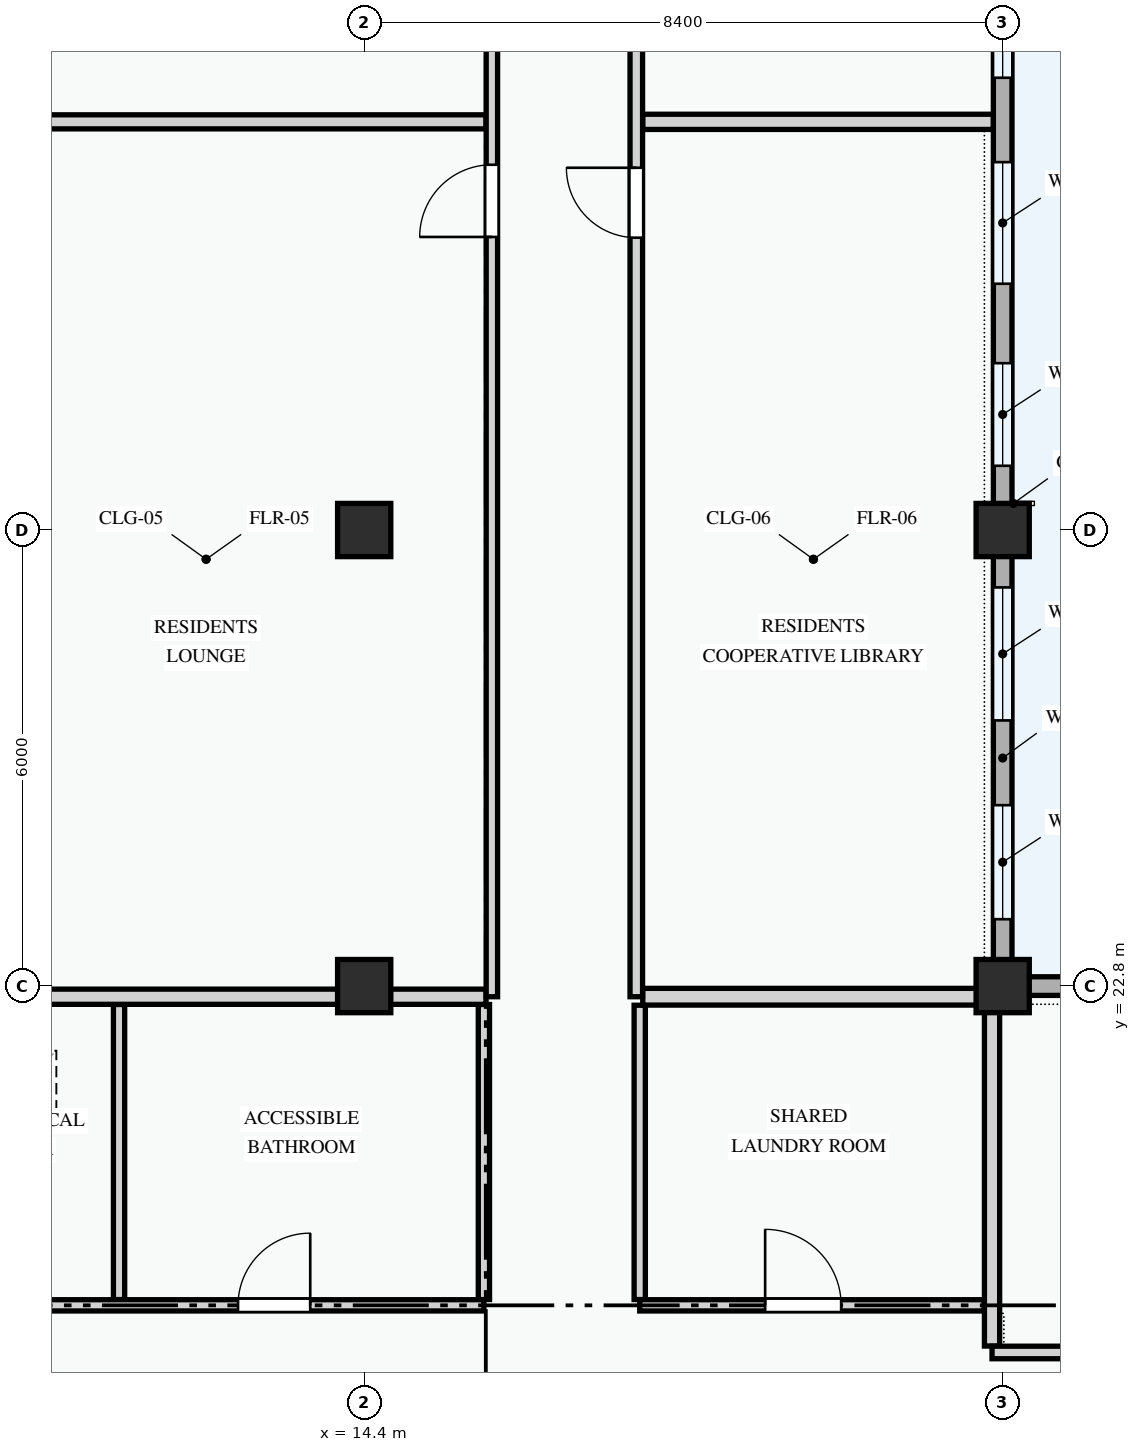
"""IFC4 building model, lengths in metres.
Left out: names, types, materials, properties, quantities, classifications, styles, units other than length and angle.
Written with IfcOpenShell. Run it as: python <this file> out.ifc"""

import sys

from ifc_helpers import new_model, si_unit, direction, frame, frame_2d, origin, origin_2d, place, context, subcontext, project, spatial, rectangle, extrude, element, fill, save


model = new_model("IFC4")
c1 = context("Model", 3, precision=1e-05, world=origin(), true_north=direction((0.0, 1.0)))
c2 = subcontext(c1, "Body", "Model", "MODEL_VIEW")
j1 = project(units=[si_unit("LENGTHUNIT", "METRE"), si_unit("PLANEANGLEUNIT", "RADIAN")], contexts=[c1])
p1 = place(None, origin())
s1 = spatial("IfcSite", under=j1, at=p1, CompositionType="ELEMENT")
p2 = place(p1, origin())
s2 = spatial("IfcBuilding", under=s1, at=p2, CompositionType="ELEMENT")
p3 = place(p2, origin())
s3 = spatial("IfcBuildingStorey", under=s2, at=p3, CompositionType="ELEMENT", Elevation=0.0)
for number, where, z_axis, x_axis in (
    (1, (14.4, 22.8, 0.0), (0.0, 0.0, 1.0), (1.0, 0.0, 0.0)),
    (2, (14.4, 28.8, 0.0), (0.0, 0.0, 1.0), (1.0, 0.0, 0.0)),
    (3, (22.8, 22.8, 0.0), (0.0, 0.0, 1.0), (1.0, 0.0, 0.0)),
    (4, (22.8, 28.8, 0.0), (0.0, 0.0, 1.0), (1.0, 0.0, 0.0)),
):
    element("IfcColumn", number, at=place(p3, frame(where, z_axis=z_axis, x_axis=x_axis)), inside=s3, PredefinedType="COLUMN", context=c2, shape_type="SweptSolid", body=[
        extrude(rectangle(XDim=0.7, YDim=0.7, at=origin_2d()), origin(), (0.0, 0.0, 1.0), 4.5),
    ])
p4 = place(p3, frame((22.8, 22.8, 0.0), z_axis=(0.0, 0.0, 1.0), x_axis=(0.0, 1.0, 0.0)))
e5 = element("IfcWall", 5, at=p4, inside=s3, PredefinedType="STANDARD", context=c2, shape_type="SweptSolid", body=[
    extrude(rectangle(XDim=6.0, YDim=0.245, at=frame_2d((3.0, 0.0))), origin(), (0.0, 0.0, 1.0), 3.585),
])
p5 = place(p4, frame((0.88, 0.0, 0.78)))
e6 = element("IfcOpeningElement", 6, at=p5, cuts=e5, PredefinedType="OPENING", context=c2, shape_type="SweptSolid", body=[
    extrude(rectangle(XDim=1.5, YDim=1.5, at=frame_2d((0.75, 0.75))), frame((0.0, 0.133, 0.0), z_axis=(0.0, -1.0, 0.0), x_axis=(1.0, 0.0, 0.0)), (0.0, 0.0, 1.0), 0.265),
])
p6 = place(p4, frame((3.495, 0.0, 0.78)))
e7 = element("IfcOpeningElement", 7, at=p6, cuts=e5, PredefinedType="OPENING", context=c2, shape_type="SweptSolid", body=[
    extrude(rectangle(XDim=1.75, YDim=1.45, at=frame_2d((0.875, 0.725))), frame((0.0, 0.133, 0.0), z_axis=(0.0, -1.0, 0.0), x_axis=(1.0, 0.0, 0.0)), (0.0, 0.0, 1.0), 0.265),
])
p7 = place(p3, frame((22.8, 28.8, 0.0), z_axis=(0.0, 0.0, 1.0), x_axis=(0.0, 1.0, 0.0)))
e8 = element("IfcWall", 8, at=p7, inside=s3, PredefinedType="STANDARD", context=c2, shape_type="SweptSolid", body=[
    extrude(rectangle(XDim=8.4, YDim=0.245, at=frame_2d((4.2, 0.0))), origin(), (0.0, 0.0, 1.0), 3.485),
])
p8 = place(p7, frame((0.845, 0.0, 0.78)))
e9 = element("IfcOpeningElement", 9, at=p8, cuts=e8, PredefinedType="OPENING", context=c2, shape_type="SweptSolid", body=[
    extrude(rectangle(XDim=1.35, YDim=1.55, at=frame_2d((0.675, 0.775))), frame((0.0, 0.133, 0.0), z_axis=(0.0, -1.0, 0.0), x_axis=(1.0, 0.0, 0.0)), (0.0, 0.0, 1.0), 0.265),
])
p9 = place(p7, frame((3.24, 0.0, 0.78)))
e10 = element("IfcOpeningElement", 10, at=p9, cuts=e8, PredefinedType="OPENING", context=c2, shape_type="SweptSolid", body=[
    extrude(rectangle(XDim=1.6, YDim=1.75, at=frame_2d((0.8, 0.875))), frame((0.0, 0.133, 0.0), z_axis=(0.0, -1.0, 0.0), x_axis=(1.0, 0.0, 0.0)), (0.0, 0.0, 1.0), 0.265),
])
p10 = place(p7, frame((5.95, 0.0, 0.78)))
e11 = element("IfcOpeningElement", 11, at=p10, cuts=e8, PredefinedType="OPENING", context=c2, shape_type="SweptSolid", body=[
    extrude(rectangle(XDim=1.68, YDim=1.46, at=frame_2d((0.84, 0.73))), frame((0.0, 0.133, 0.0), z_axis=(0.0, -1.0, 0.0), x_axis=(1.0, 0.0, 0.0)), (0.0, 0.0, 1.0), 0.265),
])
p11 = place(p3, frame((28.8, 22.8, 0.0), z_axis=(0.0, 0.0, 1.0), x_axis=(-1.0, 0.0, 0.0)))
e12 = element("IfcWall", 12, at=p11, inside=s3, PredefinedType="STANDARD", context=c2, shape_type="SweptSolid", body=[
    extrude(rectangle(XDim=6.0, YDim=0.245, at=frame_2d((3.0, 0.0))), origin(), (0.0, 0.0, 1.0), 3.585),
])
p12 = place(p11, frame((1.005, 0.0, 0.78)))
e13 = element("IfcOpeningElement", 13, at=p12, cuts=e12, PredefinedType="OPENING", context=c2, shape_type="SweptSolid", body=[
    extrude(rectangle(XDim=1.25, YDim=1.45, at=frame_2d((0.625, 0.725))), frame((0.0, 0.133, 0.0), z_axis=(0.0, -1.0, 0.0), x_axis=(1.0, 0.0, 0.0)), (0.0, 0.0, 1.0), 0.265),
])
p13 = place(p11, frame((3.56, 0.0, 0.78)))
e14 = element("IfcOpeningElement", 14, at=p13, cuts=e12, PredefinedType="OPENING", context=c2, shape_type="SweptSolid", body=[
    extrude(rectangle(XDim=1.62, YDim=1.38, at=frame_2d((0.81, 0.69))), frame((0.0, 0.133, 0.0), z_axis=(0.0, -1.0, 0.0), x_axis=(1.0, 0.0, 0.0)), (0.0, 0.0, 1.0), 0.265),
])
for number, where, z_axis, x_axis in (
    (15, (11.175, 18.676, 0.0), (0.0, 0.0, 1.0), (0.0, 1.0, 0.0)),
    (16, (15.975, 18.676, 0.0), (0.0, 0.0, 1.0), (0.0, 1.0, 0.0)),
):
    element("IfcWall", number, at=place(p3, frame(where, z_axis=z_axis, x_axis=x_axis)), inside=s3, PredefinedType="PARTITIONING", context=c2, shape_type="SweptSolid", body=[
        extrude(rectangle(XDim=3.882, YDim=0.148, at=frame_2d((1.941, 0.0))), origin(), (0.0, 0.0, 1.0), 4.2),
    ])
p14 = place(p3, frame((18.025, 18.676, 0.0), z_axis=(0.0, 0.0, 1.0), x_axis=(0.0, 1.0, 0.0)))
e17 = element("IfcWall", 17, at=p14, inside=s3, PredefinedType="PARTITIONING", context=c2, shape_type="SweptSolid", body=[
    extrude(rectangle(XDim=3.872, YDim=0.148, at=frame_2d((1.936, 0.0))), origin(), (0.0, 0.0, 1.0), 4.2),
])
p15 = place(p3, frame((8.54, 18.6, 0.0), z_axis=(0.0, 0.0, 1.0), x_axis=(1.0, 0.0, 0.0)))
e18 = element("IfcWall", 18, at=p15, inside=s3, PredefinedType="PARTITIONING", context=c2, shape_type="SweptSolid", body=[
    extrude(rectangle(XDim=7.435, YDim=0.148, at=frame_2d((3.718, 0.0))), origin(), (0.0, 0.0, 1.0), 4.2),
])
p16 = place(p15, frame((0.65, 0.0, 0.0)))
e19 = element("IfcOpeningElement", 19, at=p16, cuts=e18, PredefinedType="OPENING", context=c2, shape_type="SweptSolid", body=[
    extrude(rectangle(XDim=0.9, YDim=2.1, at=frame_2d((0.45, 1.05))), frame((0.0, 0.084, 0.0), z_axis=(0.0, -1.0, 0.0), x_axis=(1.0, 0.0, 0.0)), (0.0, 0.0, 1.0), 0.168),
])
p17 = place(p15, frame((4.2, 0.0, 0.0)))
e20 = element("IfcOpeningElement", 20, at=p17, cuts=e18, PredefinedType="OPENING", context=c2, shape_type="SweptSolid", body=[
    extrude(rectangle(XDim=0.95, YDim=2.1, at=frame_2d((0.475, 1.05))), frame((0.0, 0.084, 0.0), z_axis=(0.0, -1.0, 0.0), x_axis=(1.0, 0.0, 0.0)), (0.0, 0.0, 1.0), 0.168),
])
p18 = place(p3, frame((18.025, 18.6, 0.0), z_axis=(0.0, 0.0, 1.0), x_axis=(1.0, 0.0, 0.0)))
e21 = element("IfcWall", 21, at=p18, inside=s3, PredefinedType="PARTITIONING", context=c2, shape_type="SweptSolid", body=[
    extrude(rectangle(XDim=4.533, YDim=0.148, at=frame_2d((2.267, 0.0))), origin(), (0.0, 0.0, 1.0), 4.2),
])
p19 = place(p18, frame((1.65, 0.0, 0.0)))
e22 = element("IfcOpeningElement", 22, at=p19, cuts=e21, PredefinedType="OPENING", context=c2, shape_type="SweptSolid", body=[
    extrude(rectangle(XDim=1.0, YDim=2.15, at=frame_2d((0.5, 1.075))), frame((0.0, 0.084, 0.0), z_axis=(0.0, -1.0, 0.0), x_axis=(1.0, 0.0, 0.0)), (0.0, 0.0, 1.0), 0.168),
])
p20 = place(p3, frame((8.524, 22.66, 0.0), z_axis=(0.0, 0.0, 1.0), x_axis=(1.0, 0.0, 0.0)))
e23 = element("IfcWall", 23, at=p20, inside=s3, PredefinedType="PARTITIONING", context=c2, shape_type="SweptSolid", body=[
    extrude(rectangle(XDim=7.479, YDim=0.2, at=frame_2d((3.739, 0.0))), origin(), (0.0, 0.0, 1.0), 3.485),
])
p21 = place(p3, frame((18.064, 22.66, 0.0), z_axis=(0.0, 0.0, 1.0), x_axis=(1.0, 0.0, 0.0)))
e24 = element("IfcWall", 24, at=p21, inside=s3, PredefinedType="PARTITIONING", context=c2, shape_type="SweptSolid", body=[
    extrude(rectangle(XDim=4.494, YDim=0.22, at=frame_2d((2.247, 0.0))), origin(), (0.0, 0.0, 1.0), 3.485),
])
p22 = place(p3, frame((8.524, 34.17, 0.0), z_axis=(0.0, 0.0, 1.0), x_axis=(1.0, 0.0, 0.0)))
e25 = element("IfcWall", 25, at=p22, inside=s3, PredefinedType="PARTITIONING", context=c2, shape_type="SweptSolid", body=[
    extrude(rectangle(XDim=7.479, YDim=0.185, at=frame_2d((3.739, 0.0))), origin(), (0.0, 0.0, 1.0), 4.2),
])
p23 = place(p3, frame((18.064, 34.17, 0.0), z_axis=(0.0, 0.0, 1.0), x_axis=(1.0, 0.0, 0.0)))
e26 = element("IfcWall", 26, at=p23, inside=s3, PredefinedType="PARTITIONING", context=c2, shape_type="SweptSolid", body=[
    extrude(rectangle(XDim=4.611, YDim=0.2, at=frame_2d((2.306, 0.0))), origin(), (0.0, 0.0, 1.0), 4.2),
])
p24 = place(p3, frame((16.08, 22.66, 0.0), z_axis=(0.0, 0.0, 1.0), x_axis=(0.0, 1.0, 0.0)))
e27 = element("IfcWall", 27, at=p24, inside=s3, PredefinedType="PARTITIONING", context=c2, shape_type="SweptSolid", body=[
    extrude(rectangle(XDim=34.816, YDim=0.15, at=frame_2d((17.408, 0.0))), origin(), (0.0, 0.0, 1.0), 4.2),
])
p25 = place(p24, frame((9.996, 0.0, 0.0)))
e28 = element("IfcOpeningElement", 28, at=p25, cuts=e27, PredefinedType="OPENING", context=c2, shape_type="SweptSolid", body=[
    extrude(rectangle(XDim=0.95, YDim=2.1, at=frame_2d((0.475, 1.05))), frame((0.0, 0.085, 0.0), z_axis=(0.0, -1.0, 0.0), x_axis=(1.0, 0.0, 0.0)), (0.0, 0.0, 1.0), 0.17),
])
p26 = place(p24, frame((16.965, 0.0, 0.0)))
e29 = element("IfcOpeningElement", 29, at=p26, cuts=e27, PredefinedType="OPENING", context=c2, shape_type="SweptSolid", body=[
    extrude(rectangle(XDim=0.95, YDim=2.1, at=frame_2d((0.475, 1.05))), frame((0.0, 0.085, 0.0), z_axis=(0.0, -1.0, 0.0), x_axis=(1.0, 0.0, 0.0)), (0.0, 0.0, 1.0), 0.17),
])
p27 = place(p24, frame((24.249, 0.0, 0.0)))
e30 = element("IfcOpeningElement", 30, at=p27, cuts=e27, PredefinedType="OPENING", context=c2, shape_type="SweptSolid", body=[
    extrude(rectangle(XDim=0.95, YDim=2.1, at=frame_2d((0.475, 1.05))), frame((0.0, 0.085, 0.0), z_axis=(0.0, -1.0, 0.0), x_axis=(1.0, 0.0, 0.0)), (0.0, 0.0, 1.0), 0.17),
])
p28 = place(p3, frame((17.98, 22.66, 0.0), z_axis=(0.0, 0.0, 1.0), x_axis=(0.0, 1.0, 0.0)))
e31 = element("IfcWall", 31, at=p28, inside=s3, PredefinedType="PARTITIONING", context=c2, shape_type="SweptSolid", body=[
    extrude(rectangle(XDim=34.816, YDim=0.165, at=frame_2d((17.408, 0.0))), origin(), (0.0, 0.0, 1.0), 4.2),
])
p29 = place(p28, frame((9.986, 0.0, 0.0)))
e32 = element("IfcOpeningElement", 32, at=p29, cuts=e31, PredefinedType="OPENING", context=c2, shape_type="SweptSolid", body=[
    extrude(rectangle(XDim=0.92, YDim=2.1, at=frame_2d((0.46, 1.05))), frame((0.0, 0.093, 0.0), z_axis=(0.0, -1.0, 0.0), x_axis=(1.0, 0.0, 0.0)), (0.0, 0.0, 1.0), 0.185),
])
p30 = place(p28, frame((16.96, 0.0, 0.0)))
e33 = element("IfcOpeningElement", 33, at=p30, cuts=e31, PredefinedType="OPENING", context=c2, shape_type="SweptSolid", body=[
    extrude(rectangle(XDim=0.92, YDim=2.1, at=frame_2d((0.46, 1.05))), frame((0.0, 0.093, 0.0), z_axis=(0.0, -1.0, 0.0), x_axis=(1.0, 0.0, 0.0)), (0.0, 0.0, 1.0), 0.185),
])
p31 = place(p28, frame((24.248, 0.0, 0.0)))
e34 = element("IfcOpeningElement", 34, at=p31, cuts=e31, PredefinedType="OPENING", context=c2, shape_type="SweptSolid", body=[
    extrude(rectangle(XDim=0.92, YDim=2.1, at=frame_2d((0.46, 1.05))), frame((0.0, 0.093, 0.0), z_axis=(0.0, -1.0, 0.0), x_axis=(1.0, 0.0, 0.0)), (0.0, 0.0, 1.0), 0.185),
])
p32 = place(p3, frame((22.66, 18.064, 0.0), z_axis=(0.0, 0.0, 1.0), x_axis=(0.0, 1.0, 0.0)))
e35 = element("IfcWall", 35, at=p32, inside=s3, PredefinedType="PARTITIONING", context=c2, shape_type="SweptSolid", body=[
    extrude(rectangle(XDim=4.676, YDim=0.2, at=frame_2d((2.338, 0.0))), origin(), (0.0, 0.0, 1.0), 3.485),
])
p33 = place(p3, frame((22.66, 17.98, 0.0), z_axis=(0.0, 0.0, 1.0), x_axis=(1.0, 0.0, 0.0)))
e36 = element("IfcWall", 36, at=p33, inside=s3, PredefinedType="PARTITIONING", context=c2, shape_type="SweptSolid", body=[
    extrude(rectangle(XDim=34.816, YDim=0.165, at=frame_2d((17.408, 0.0))), origin(), (0.0, 0.0, 1.0), 4.2),
])
p34 = place(p33, frame((9.986, 0.0, 0.0)))
e37 = element("IfcOpeningElement", 37, at=p34, cuts=e36, PredefinedType="OPENING", context=c2, shape_type="SweptSolid", body=[
    extrude(rectangle(XDim=0.92, YDim=2.1, at=frame_2d((0.46, 1.05))), frame((0.0, 0.093, 0.0), z_axis=(0.0, -1.0, 0.0), x_axis=(1.0, 0.0, 0.0)), (0.0, 0.0, 1.0), 0.185),
])
p35 = place(p33, frame((16.96, 0.0, 0.0)))
e38 = element("IfcOpeningElement", 38, at=p35, cuts=e36, PredefinedType="OPENING", context=c2, shape_type="SweptSolid", body=[
    extrude(rectangle(XDim=0.92, YDim=2.1, at=frame_2d((0.46, 1.05))), frame((0.0, 0.093, 0.0), z_axis=(0.0, -1.0, 0.0), x_axis=(1.0, 0.0, 0.0)), (0.0, 0.0, 1.0), 0.185),
])
p36 = place(p33, frame((24.248, 0.0, 0.0)))
e39 = element("IfcOpeningElement", 39, at=p36, cuts=e36, PredefinedType="OPENING", context=c2, shape_type="SweptSolid", body=[
    extrude(rectangle(XDim=0.96, YDim=2.12, at=frame_2d((0.48, 1.06))), frame((0.0, 0.093, 0.0), z_axis=(0.0, -1.0, 0.0), x_axis=(1.0, 0.0, 0.0)), (0.0, 0.0, 1.0), 0.185),
])
p37 = place(p5, origin())
e40 = element("IfcWindow", 40, at=p37, inside=s3, PartitioningType="SINGLE_PANEL", PredefinedType="WINDOW", context=c2, shape_type="SweptSolid", body=[
    extrude(rectangle(XDim=1.5, YDim=1.5, at=frame_2d((0.75, 0.75))), frame((0.0, 0.03, 0.0), z_axis=(0.0, -1.0, 0.0), x_axis=(1.0, 0.0, 0.0)), (0.0, 0.0, 1.0), 0.06),
])
fill(e6, e40)
p38 = place(p6, origin())
e41 = element("IfcWindow", 41, at=p38, inside=s3, PartitioningType="DOUBLE_PANEL_VERTICAL", PredefinedType="WINDOW", context=c2, shape_type="SweptSolid", body=[
    extrude(rectangle(XDim=1.75, YDim=1.45, at=frame_2d((0.875, 0.725))), frame((0.0, 0.03, 0.0), z_axis=(0.0, -1.0, 0.0), x_axis=(1.0, 0.0, 0.0)), (0.0, 0.0, 1.0), 0.06),
])
fill(e7, e41)
p39 = place(p8, origin())
e42 = element("IfcWindow", 42, at=p39, inside=s3, PartitioningType="SINGLE_PANEL", PredefinedType="WINDOW", context=c2, shape_type="SweptSolid", body=[
    extrude(rectangle(XDim=1.35, YDim=1.55, at=frame_2d((0.675, 0.775))), frame((0.0, 0.03, 0.0), z_axis=(0.0, -1.0, 0.0), x_axis=(1.0, 0.0, 0.0)), (0.0, 0.0, 1.0), 0.06),
])
fill(e9, e42)
p40 = place(p9, origin())
e43 = element("IfcWindow", 43, at=p40, inside=s3, PartitioningType="DOUBLE_PANEL_VERTICAL", PredefinedType="WINDOW", context=c2, shape_type="SweptSolid", body=[
    extrude(rectangle(XDim=1.6, YDim=1.75, at=frame_2d((0.8, 0.875))), frame((0.0, 0.03, 0.0), z_axis=(0.0, -1.0, 0.0), x_axis=(1.0, 0.0, 0.0)), (0.0, 0.0, 1.0), 0.06),
])
fill(e10, e43)
p41 = place(p10, origin())
e44 = element("IfcWindow", 44, at=p41, inside=s3, PartitioningType="DOUBLE_PANEL_VERTICAL", PredefinedType="WINDOW", context=c2, shape_type="SweptSolid", body=[
    extrude(rectangle(XDim=1.68, YDim=1.46, at=frame_2d((0.84, 0.73))), frame((0.0, 0.03, 0.0), z_axis=(0.0, -1.0, 0.0), x_axis=(1.0, 0.0, 0.0)), (0.0, 0.0, 1.0), 0.06),
])
fill(e11, e44)
p42 = place(p17, origin())
e45 = element("IfcDoor", 45, at=p42, inside=s3, OperationType="SINGLE_SWING_RIGHT", PredefinedType="DOOR", context=c2, shape_type="SweptSolid", body=[
    extrude(rectangle(XDim=0.95, YDim=2.1, at=frame_2d((0.475, 1.05))), frame((0.0, 0.025, 0.0), z_axis=(0.0, -1.0, 0.0), x_axis=(1.0, 0.0, 0.0)), (0.0, 0.0, 1.0), 0.05),
])
fill(e20, e45)
p43 = place(p19, origin())
e46 = element("IfcDoor", 46, at=p43, inside=s3, OperationType="SINGLE_SWING_LEFT", PredefinedType="DOOR", context=c2, shape_type="SweptSolid", body=[
    extrude(rectangle(XDim=1.0, YDim=2.15, at=frame_2d((0.5, 1.075))), frame((0.0, 0.025, 0.0), z_axis=(0.0, -1.0, 0.0), x_axis=(1.0, 0.0, 0.0)), (0.0, 0.0, 1.0), 0.05),
])
fill(e22, e46)
p44 = place(p25, origin())
e47 = element("IfcDoor", 47, at=p44, inside=s3, OperationType="SINGLE_SWING_LEFT", PredefinedType="DOOR", context=c2, shape_type="SweptSolid", body=[
    extrude(rectangle(XDim=0.95, YDim=2.1, at=frame_2d((0.475, 1.05))), frame((0.0, 0.025, 0.0), z_axis=(0.0, -1.0, 0.0), x_axis=(1.0, 0.0, 0.0)), (0.0, 0.0, 1.0), 0.05),
])
fill(e28, e47)
p45 = place(p29, origin())
e48 = element("IfcDoor", 48, at=p45, inside=s3, OperationType="SINGLE_SWING_RIGHT", PredefinedType="DOOR", context=c2, shape_type="SweptSolid", body=[
    extrude(rectangle(XDim=0.92, YDim=2.1, at=frame_2d((0.46, 1.05))), frame((0.0, 0.025, 0.0), z_axis=(0.0, -1.0, 0.0), x_axis=(1.0, 0.0, 0.0)), (0.0, 0.0, 1.0), 0.05),
])
fill(e32, e48)
save(model, sys.argv[1])
